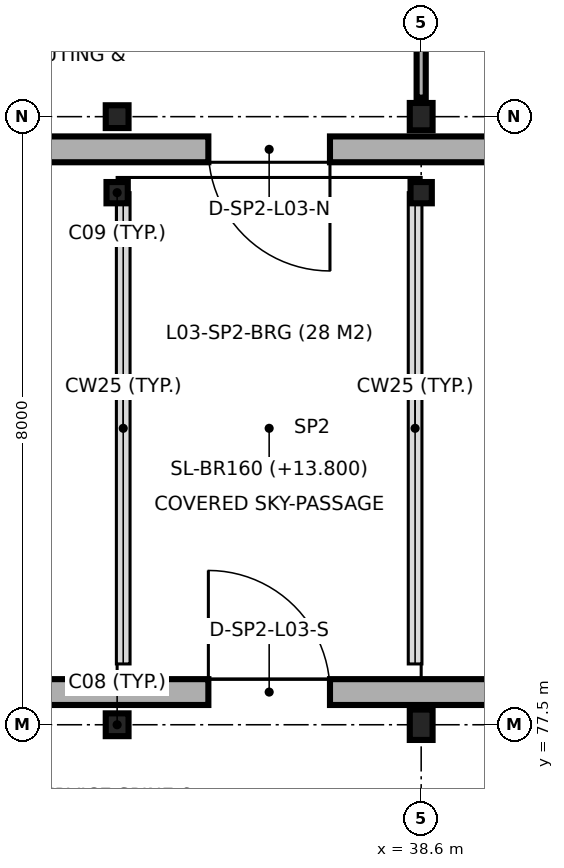
"""IFC4 building model, lengths in metres.
Left out: names, types, materials, properties, quantities, classifications, styles, units other than length and angle.
Written with IfcOpenShell. Run it as: python <this file> out.ifc"""

import sys

from ifc_helpers import new_model, si_unit, direction, frame, frame_2d, origin, origin_2d, place, context, subcontext, project, spatial, rectangle, i_section, extrude, element, fill, save


model = new_model("IFC4")
c1 = context("Model", 3, precision=1e-05, world=origin(), true_north=direction((0.0, 1.0)))
c2 = subcontext(c1, "Body", "Model", "MODEL_VIEW")
j1 = project(units=[si_unit("LENGTHUNIT", "METRE"), si_unit("PLANEANGLEUNIT", "RADIAN")], contexts=[c1])
p1 = place(None, origin())
s1 = spatial("IfcSite", under=j1, at=p1, CompositionType="ELEMENT")
p2 = place(p1, origin())
s2 = spatial("IfcBuilding", under=s1, at=p2, CompositionType="ELEMENT")
p3 = place(p2, frame((0.0, 0.0, 13.8)))
s3 = spatial("IfcBuildingStorey", under=s2, at=p3, CompositionType="ELEMENT", Elevation=13.8)
p4 = place(p3, frame((34.6, 77.5, 0.0), z_axis=(0.0, 0.0, 1.0), x_axis=(1.0, 0.0, 0.0)))
e1 = element("IfcColumn", 1, at=p4, inside=s3, PredefinedType="COLUMN", context=c2, shape_type="SweptSolid", body=[
    extrude(i_section(OverallWidth=0.3, OverallDepth=0.3, WebThickness=0.011, FlangeThickness=0.019, FilletRadius=0.027, at=origin_2d()), origin(), (0.0, 0.0, 1.0), 4.5),
])
p5 = place(p3, frame((34.6, 84.5, 0.0), z_axis=(0.0, 0.0, 1.0), x_axis=(1.0, 0.0, 0.0)))
e2 = element("IfcColumn", 2, at=p5, inside=s3, PredefinedType="COLUMN", context=c2, shape_type="SweptSolid", body=[
    extrude(i_section(OverallWidth=0.28, OverallDepth=0.28, WebThickness=0.01, FlangeThickness=0.018, FilletRadius=0.024, at=origin_2d()), origin(), (0.0, 0.0, 1.0), 4.5),
])
p6 = place(p3, frame((34.6, 85.5, 0.0), z_axis=(0.0, 0.0, 1.0), x_axis=(1.0, 0.0, 0.0)))
e3 = element("IfcColumn", 3, at=p6, inside=s3, PredefinedType="COLUMN", context=c2, shape_type="SweptSolid", body=[
    extrude(i_section(OverallWidth=0.3, OverallDepth=0.3, WebThickness=0.011, FlangeThickness=0.019, FilletRadius=0.027, at=origin_2d()), origin(), (0.0, 0.0, 1.0), 4.5),
])
p7 = place(p3, frame((38.6, 77.5, 0.0), z_axis=(0.0, 0.0, 1.0), x_axis=(1.0, 0.0, 0.0)))
e4 = element("IfcColumn", 4, at=p7, inside=s3, PredefinedType="COLUMN", context=c2, shape_type="SweptSolid", body=[
    extrude(i_section(OverallWidth=0.3, OverallDepth=0.4, WebThickness=0.013, FlangeThickness=0.024, FilletRadius=0.027, at=origin_2d()), origin(), (0.0, 0.0, 1.0), 4.5),
])
p8 = place(p3, frame((38.6, 84.5, 0.0), z_axis=(0.0, 0.0, 1.0), x_axis=(1.0, 0.0, 0.0)))
e5 = element("IfcColumn", 5, at=p8, inside=s3, PredefinedType="COLUMN", context=c2, shape_type="SweptSolid", body=[
    extrude(i_section(OverallWidth=0.28, OverallDepth=0.28, WebThickness=0.01, FlangeThickness=0.018, FilletRadius=0.024, at=origin_2d()), origin(), (0.0, 0.0, 1.0), 4.5),
])
p9 = place(p3, frame((38.6, 85.5, 0.0), z_axis=(0.0, 0.0, 1.0), x_axis=(1.0, 0.0, 0.0)))
e6 = element("IfcColumn", 6, at=p9, inside=s3, PredefinedType="COLUMN", context=c2, shape_type="SweptSolid", body=[
    extrude(i_section(OverallWidth=0.3, OverallDepth=0.36, WebThickness=0.012, FlangeThickness=0.022, FilletRadius=0.027, at=origin_2d()), origin(), (0.0, 0.0, 1.0), 4.5),
])
p10 = place(p3, frame((43.677, 77.93, 0.0), z_axis=(0.0, 0.0, 1.0), x_axis=(-1.0, 0.0, 0.0)))
e7 = element("IfcWall", 7, at=p10, inside=s3, PredefinedType="SOLIDWALL", context=c2, shape_type="SweptSolid", body=[
    extrude(rectangle(XDim=38.077, YDim=0.34, at=frame_2d((19.039, 0.0))), origin(), (0.0, 0.0, 1.0), 4.25),
])
p11 = place(p10, frame((6.277, 0.0, 0.0)))
e8 = element("IfcOpeningElement", 8, at=p11, cuts=e7, PredefinedType="OPENING", context=c2, shape_type="SweptSolid", body=[
    extrude(rectangle(XDim=1.6, YDim=2.2, at=frame_2d((0.8, 1.1))), frame((0.0, 0.18, 0.0), z_axis=(0.0, -1.0, 0.0), x_axis=(1.0, 0.0, 0.0)), (0.0, 0.0, 1.0), 0.36),
])
p12 = place(p10, frame((1.089, 0.0, 0.9)))
e9 = element("IfcOpeningElement", 9, at=p12, cuts=e7, PredefinedType="OPENING", context=c2, shape_type="SweptSolid", body=[
    extrude(rectangle(XDim=3.0, YDim=1.8, at=frame_2d((1.5, 0.9))), frame((0.0, 0.18, 0.0), z_axis=(0.0, -1.0, 0.0), x_axis=(1.0, 0.0, 0.0)), (0.0, 0.0, 1.0), 0.36),
])
p13 = place(p10, frame((10.507, 0.0, 0.9)))
e10 = element("IfcOpeningElement", 10, at=p13, cuts=e7, PredefinedType="OPENING", context=c2, shape_type="SweptSolid", body=[
    extrude(rectangle(XDim=1.5, YDim=2.1, at=frame_2d((0.75, 1.05))), frame((0.0, 0.18, 0.0), z_axis=(0.0, -1.0, 0.0), x_axis=(1.0, 0.0, 0.0)), (0.0, 0.0, 1.0), 0.36),
])
p14 = place(p10, frame((16.027, 0.0, 0.9)))
e11 = element("IfcOpeningElement", 11, at=p14, cuts=e7, PredefinedType="OPENING", context=c2, shape_type="SweptSolid", body=[
    extrude(rectangle(XDim=2.1, YDim=2.1, at=frame_2d((1.05, 1.05))), frame((0.0, 0.18, 0.0), z_axis=(0.0, -1.0, 0.0), x_axis=(1.0, 0.0, 0.0)), (0.0, 0.0, 1.0), 0.36),
])
p15 = place(p10, frame((23.727, 0.0, 0.9)))
e12 = element("IfcOpeningElement", 12, at=p15, cuts=e7, PredefinedType="OPENING", context=c2, shape_type="SweptSolid", body=[
    extrude(rectangle(XDim=2.7, YDim=2.1, at=frame_2d((1.35, 1.05))), frame((0.0, 0.18, 0.0), z_axis=(0.0, -1.0, 0.0), x_axis=(1.0, 0.0, 0.0)), (0.0, 0.0, 1.0), 0.36),
])
p16 = place(p10, frame((32.477, 0.0, 0.9)))
e13 = element("IfcOpeningElement", 13, at=p16, cuts=e7, PredefinedType="OPENING", context=c2, shape_type="SweptSolid", body=[
    extrude(rectangle(XDim=1.2, YDim=1.5, at=frame_2d((0.6, 0.75))), frame((0.0, 0.18, 0.0), z_axis=(0.0, -1.0, 0.0), x_axis=(1.0, 0.0, 0.0)), (0.0, 0.0, 1.0), 0.36),
])
p17 = place(p3, frame((5.922, 85.07, 0.0), z_axis=(0.0, 0.0, 1.0), x_axis=(1.0, 0.0, 0.0)))
e14 = element("IfcWall", 14, at=p17, inside=s3, PredefinedType="SOLIDWALL", context=c2, shape_type="SweptSolid", body=[
    extrude(rectangle(XDim=37.878, YDim=0.34, at=frame_2d((18.939, 0.0))), origin(), (0.0, 0.0, 1.0), 4.25),
])
p18 = place(p17, frame((29.878, 0.0, 0.0)))
e15 = element("IfcOpeningElement", 15, at=p18, cuts=e14, PredefinedType="OPENING", context=c2, shape_type="SweptSolid", body=[
    extrude(rectangle(XDim=1.6, YDim=2.2, at=frame_2d((0.8, 1.1))), frame((0.0, 0.18, 0.0), z_axis=(0.0, -1.0, 0.0), x_axis=(1.0, 0.0, 0.0)), (0.0, 0.0, 1.0), 0.36),
])
p19 = place(p17, frame((3.928, 0.0, 0.9)))
e16 = element("IfcOpeningElement", 16, at=p19, cuts=e14, PredefinedType="OPENING", context=c2, shape_type="SweptSolid", body=[
    extrude(rectangle(XDim=1.5, YDim=2.1, at=frame_2d((0.75, 1.05))), frame((0.0, 0.18, 0.0), z_axis=(0.0, -1.0, 0.0), x_axis=(1.0, 0.0, 0.0)), (0.0, 0.0, 1.0), 0.36),
])
p20 = place(p17, frame((9.648, 0.0, 0.9)))
e17 = element("IfcOpeningElement", 17, at=p20, cuts=e14, PredefinedType="OPENING", context=c2, shape_type="SweptSolid", body=[
    extrude(rectangle(XDim=2.1, YDim=2.1, at=frame_2d((1.05, 1.05))), frame((0.0, 0.18, 0.0), z_axis=(0.0, -1.0, 0.0), x_axis=(1.0, 0.0, 0.0)), (0.0, 0.0, 1.0), 0.36),
])
p21 = place(p17, frame((12.888, 0.0, 0.9)))
e18 = element("IfcOpeningElement", 18, at=p21, cuts=e14, PredefinedType="OPENING", context=c2, shape_type="SweptSolid", body=[
    extrude(rectangle(XDim=2.7, YDim=2.1, at=frame_2d((1.35, 1.05))), frame((0.0, 0.18, 0.0), z_axis=(0.0, -1.0, 0.0), x_axis=(1.0, 0.0, 0.0)), (0.0, 0.0, 1.0), 0.36),
])
p22 = place(p17, frame((17.698, 0.0, 0.9)))
e19 = element("IfcOpeningElement", 19, at=p22, cuts=e14, PredefinedType="OPENING", context=c2, shape_type="SweptSolid", body=[
    extrude(rectangle(XDim=1.2, YDim=1.5, at=frame_2d((0.6, 0.75))), frame((0.0, 0.18, 0.0), z_axis=(0.0, -1.0, 0.0), x_axis=(1.0, 0.0, 0.0)), (0.0, 0.0, 1.0), 0.36),
])
p23 = place(p17, frame((20.478, 0.0, 0.9)))
e20 = element("IfcOpeningElement", 20, at=p23, cuts=e14, PredefinedType="OPENING", context=c2, shape_type="SweptSolid", body=[
    extrude(rectangle(XDim=1.8, YDim=1.5, at=frame_2d((0.9, 0.75))), frame((0.0, 0.18, 0.0), z_axis=(0.0, -1.0, 0.0), x_axis=(1.0, 0.0, 0.0)), (0.0, 0.0, 1.0), 0.36),
])
p24 = place(p17, frame((25.958, 0.0, 0.9)))
e21 = element("IfcOpeningElement", 21, at=p24, cuts=e14, PredefinedType="OPENING", context=c2, shape_type="SweptSolid", body=[
    extrude(rectangle(XDim=1.2, YDim=2.4, at=frame_2d((0.6, 1.2))), frame((0.0, 0.18, 0.0), z_axis=(0.0, -1.0, 0.0), x_axis=(1.0, 0.0, 0.0)), (0.0, 0.0, 1.0), 0.36),
])
p25 = place(p17, frame((34.228, 0.0, 0.9)))
e22 = element("IfcOpeningElement", 22, at=p25, cuts=e14, PredefinedType="OPENING", context=c2, shape_type="SweptSolid", body=[
    extrude(rectangle(XDim=2.0, YDim=2.4, at=frame_2d((1.0, 1.2))), frame((0.0, 0.18, 0.0), z_axis=(0.0, -1.0, 0.0), x_axis=(1.0, 0.0, 0.0)), (0.0, 0.0, 1.0), 0.36),
])
p26 = place(p3, frame((38.6, 85.75, 0.0), z_axis=(0.0, 0.0, 1.0), x_axis=(0.0, 1.0, 0.0)))
e23 = element("IfcWall", 23, at=p26, inside=s3, PredefinedType="PARTITIONING", context=c2, shape_type="SweptSolid", body=[
    extrude(rectangle(XDim=7.5, YDim=0.12, at=frame_2d((3.75, 0.0))), origin(), (0.0, 0.0, 1.0), 3.85),
])
p27 = place(p26, frame((5.33, 0.0, 0.0)))
e24 = element("IfcOpeningElement", 24, at=p27, cuts=e23, PredefinedType="OPENING", context=c2, shape_type="SweptSolid", body=[
    extrude(rectangle(XDim=1.0, YDim=2.15, at=frame_2d((0.5, 1.075))), frame((0.0, 0.07, 0.0), z_axis=(0.0, -1.0, 0.0), x_axis=(1.0, 0.0, 0.0)), (0.0, 0.0, 1.0), 0.14),
])
p28 = place(p11, frame((1.6, 0.0, 0.0), z_axis=(0.0, 0.0, 1.0), x_axis=(-1.0, 0.0, 0.0)))
e25 = element("IfcDoor", 25, at=p28, inside=s3, OperationType="SINGLE_SWING_RIGHT", PredefinedType="DOOR", context=c2, shape_type="SweptSolid", body=[
    extrude(rectangle(XDim=1.6, YDim=2.2, at=frame_2d((0.8, 1.1))), frame((0.0, 0.025, 0.0), z_axis=(0.0, -1.0, 0.0), x_axis=(1.0, 0.0, 0.0)), (0.0, 0.0, 1.0), 0.05),
])
fill(e8, e25)
p29 = place(p18, frame((1.6, 0.0, 0.0), z_axis=(0.0, 0.0, 1.0), x_axis=(-1.0, 0.0, 0.0)))
e26 = element("IfcDoor", 26, at=p29, inside=s3, OperationType="SINGLE_SWING_RIGHT", PredefinedType="DOOR", context=c2, shape_type="SweptSolid", body=[
    extrude(rectangle(XDim=1.6, YDim=2.2, at=frame_2d((0.8, 1.1))), frame((0.0, 0.025, 0.0), z_axis=(0.0, -1.0, 0.0), x_axis=(1.0, 0.0, 0.0)), (0.0, 0.0, 1.0), 0.05),
])
fill(e15, e26)
save(model, sys.argv[1])
